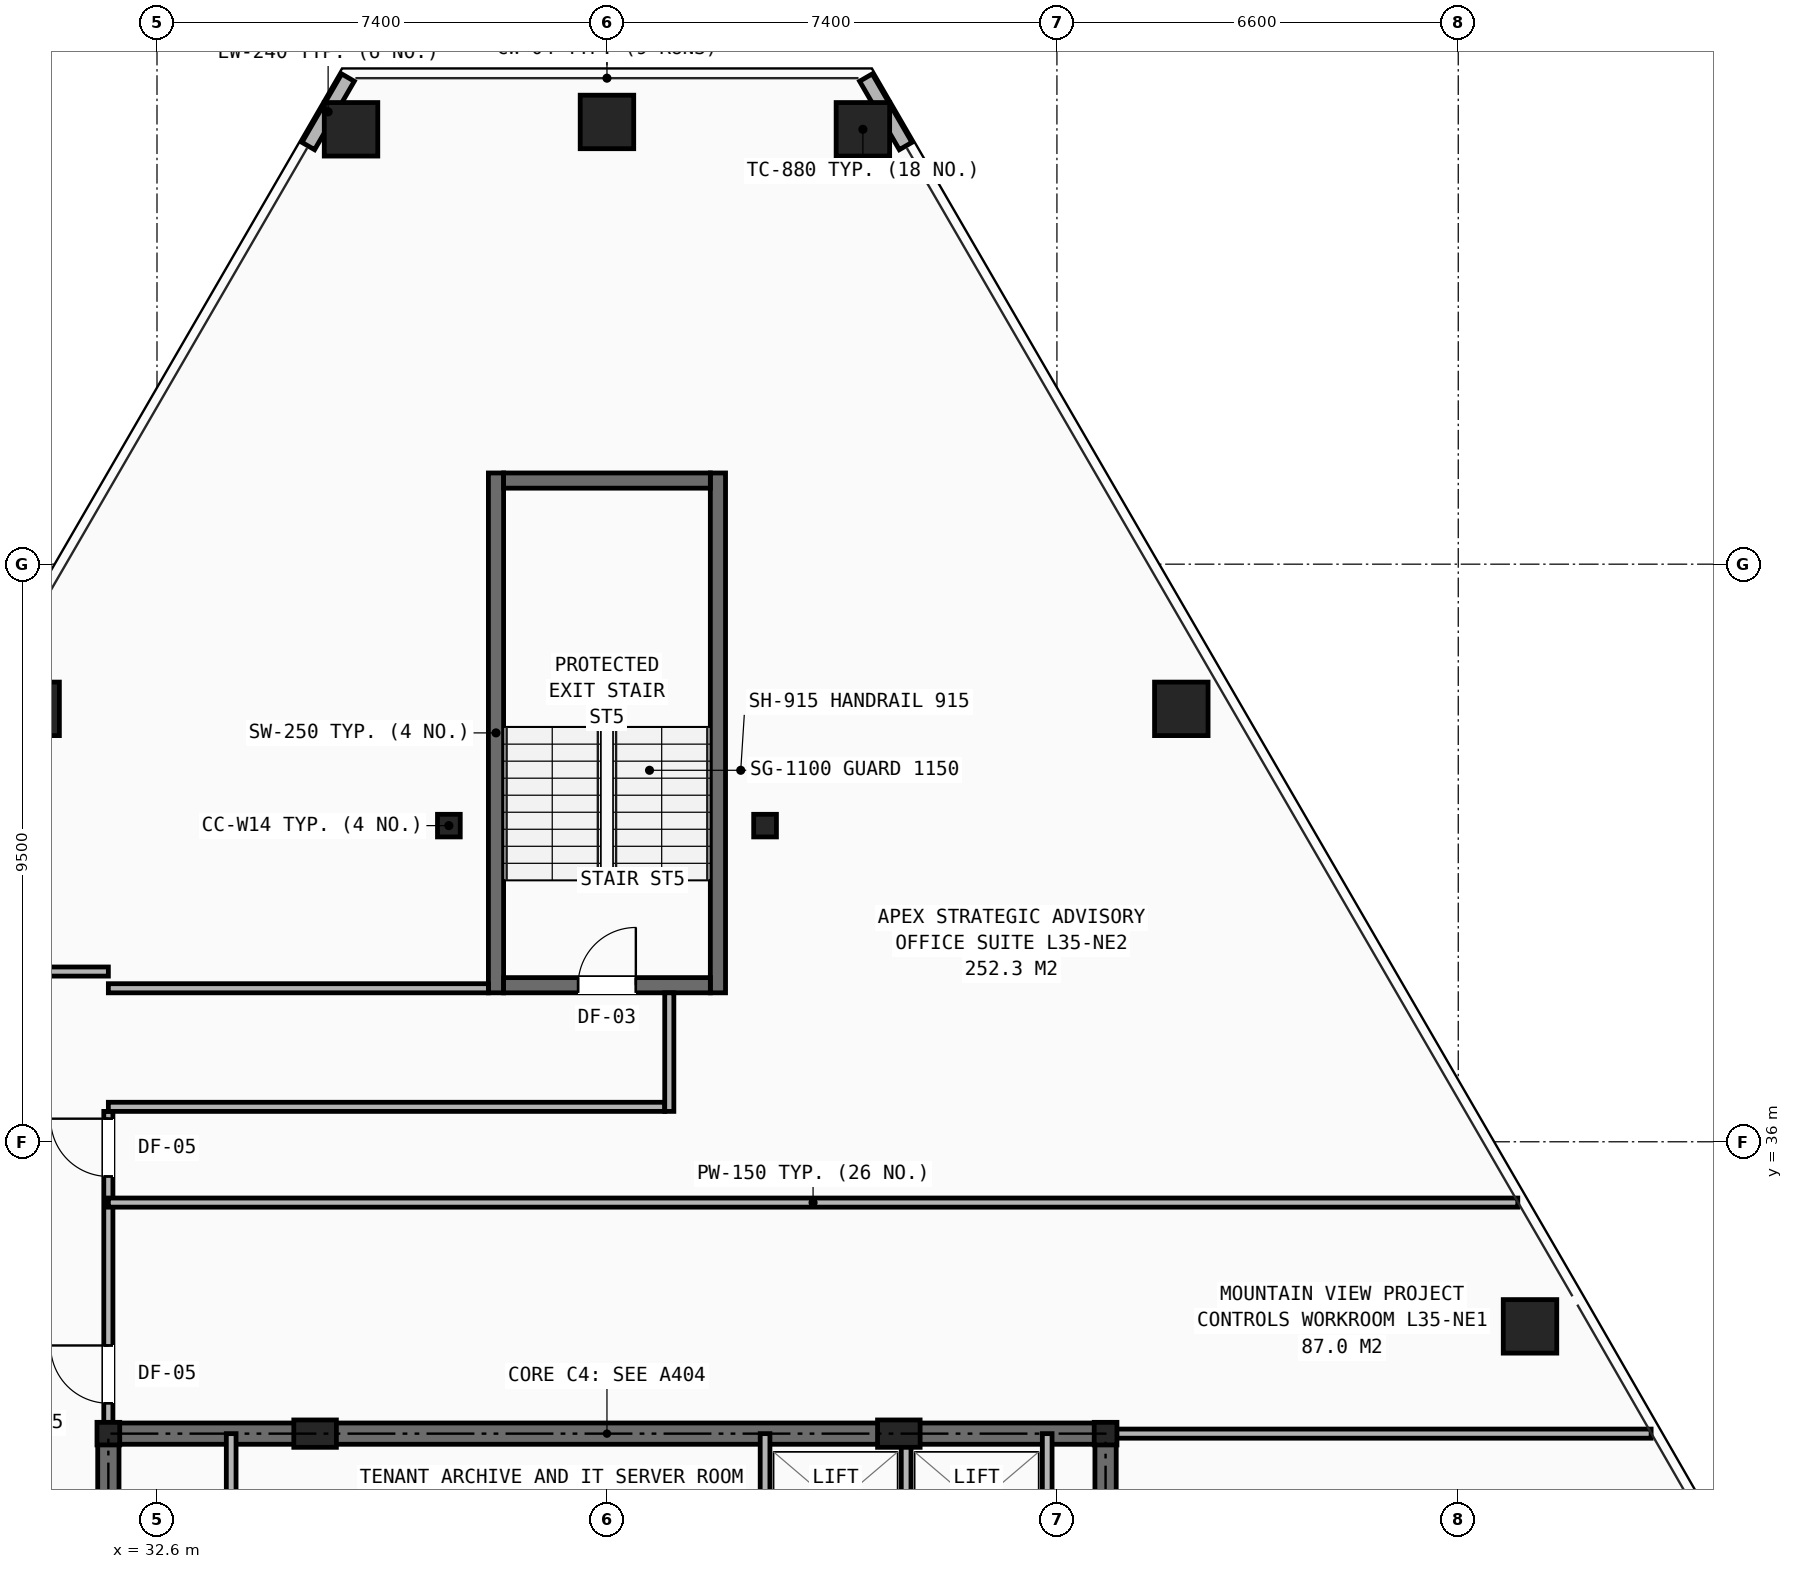
"""IFC4 building model, lengths in metres.
Left out: names, types, materials, properties, quantities, classifications, styles, units other than length and angle.
Written with IfcOpenShell. Run it as: python <this file> out.ifc"""

import sys

from ifc_helpers import new_model, si_unit, direction, frame, frame_2d, origin, origin_2d, place, context, subcontext, project, spatial, rectangle, hollow_rectangle, i_section, extrude, element, fill, save


model = new_model("IFC4")
c1 = context("Model", 3, precision=1e-05, world=origin(), true_north=direction((0.0, 1.0)))
c2 = subcontext(c1, "Body", "Model", "MODEL_VIEW")
j1 = project(units=[si_unit("LENGTHUNIT", "METRE"), si_unit("PLANEANGLEUNIT", "RADIAN")], contexts=[c1])
p1 = place(None, origin())
s1 = spatial("IfcSite", under=j1, at=p1, CompositionType="ELEMENT")
p2 = place(p1, origin())
s2 = spatial("IfcBuilding", under=s1, at=p2, CompositionType="ELEMENT")
p3 = place(p2, frame((0.0, 0.0, 122.9)))
s3 = spatial("IfcBuildingStorey", under=s2, at=p3, CompositionType="ELEMENT", Elevation=122.9)
for number, where, z_axis, x_axis in (
    (1, (31.8, 31.2, 0.0), (0.0, 0.0, 1.0), (1.0, 0.0, 0.0)),
    (2, (48.2, 31.2, 0.0), (0.0, 0.0, 1.0), (1.0, 0.0, 0.0)),
    (3, (37.4, 41.2, 0.0), (0.0, 0.0, 1.0), (1.0, 0.0, 0.0)),
    (4, (42.6, 41.2, 0.0), (0.0, 0.0, 1.0), (1.0, 0.0, 0.0)),
):
    element("IfcColumn", number, at=place(p3, frame(where, z_axis=z_axis, x_axis=x_axis)), inside=s3, PredefinedType="COLUMN", context=c2, shape_type="SweptSolid", body=[
        extrude(i_section(OverallWidth=0.374, OverallDepth=0.372, WebThickness=0.016, FlangeThickness=0.026, at=origin_2d()), origin(), (0.0, 0.0, 1.0), 3.45),
    ])
for number, where, z_axis, x_axis in (
    (5, (35.2, 31.2, 0.0), (0.0, 0.0, 1.0), (1.0, 0.0, 0.0)),
    (6, (44.8, 31.2, 0.0), (0.0, 0.0, 1.0), (1.0, 0.0, 0.0)),
):
    element("IfcColumn", number, at=place(p3, frame(where, z_axis=z_axis, x_axis=x_axis)), inside=s3, PredefinedType="PILASTER", context=c2, shape_type="SweptSolid", body=[
        extrude(rectangle(XDim=0.7, YDim=0.45, at=origin_2d()), origin(), (0.0, 0.0, 1.0), 3.45),
    ])
for number, where, z_axis, x_axis in (
    (7, (44.209, 52.652, 0.0), (0.0, 0.0, 1.0), (1.0, 0.0, 0.0)),
    (8, (40.0, 52.773, 0.0), (0.0, 0.0, 1.0), (1.0, 0.0, 0.0)),
    (9, (35.791, 52.652, 0.0), (0.0, 0.0, 1.0), (1.0, 0.0, 0.0)),
    (10, (30.554, 43.12, 0.0), (0.0, 0.0, 1.0), (1.0, 0.0, 0.0)),
    (11, (55.18, 32.964, 0.0), (0.0, 0.0, 1.0), (1.0, 0.0, 0.0)),
    (12, (49.446, 43.12, 0.0), (0.0, 0.0, 1.0), (1.0, 0.0, 0.0)),
):
    element("IfcColumn", number, at=place(p3, frame(where, z_axis=z_axis, x_axis=x_axis)), inside=s3, PredefinedType="COLUMN", context=c2, shape_type="SweptSolid", body=[
        extrude(hollow_rectangle(XDim=0.88, YDim=0.88, WallThickness=0.06, at=origin_2d()), origin(), (0.0, 0.0, 1.0), 3.45),
    ])
for number, where, z_axis, x_axis in (
    (13, (35.741, 53.503, 0.0), (0.0, 0.0, 1.0), (-0.502, -0.865, 0.0)),
    (14, (44.912, 52.377, 0.0), (0.0, 0.0, 1.0), (-0.502, 0.865, 0.0)),
):
    element("IfcWall", number, at=place(p3, frame(where, z_axis=z_axis, x_axis=x_axis)), inside=s3, PredefinedType="SHEAR", context=c2, shape_type="SweptSolid", body=[
        extrude(rectangle(XDim=1.302, YDim=0.24, at=frame_2d((0.651, 0.0))), origin(), (0.0, 0.0, 1.0), 2.583),
    ])
p4 = place(p3, frame((31.8, 31.2, 0.0), z_axis=(0.0, 0.0, 1.0), x_axis=(1.0, 0.0, 0.0)))
e15 = element("IfcWall", 15, at=p4, inside=s3, PredefinedType="SHEAR", context=c2, shape_type="SweptSolid", body=[
    extrude(rectangle(XDim=16.4, YDim=0.35, at=frame_2d((8.2, 0.0))), origin(), (0.0, 0.0, 1.0), 3.21),
])
p5 = place(p3, frame((31.8, 16.4, 0.0), z_axis=(0.0, 0.0, 1.0), x_axis=(0.0, 1.0, 0.0)))
e16 = element("IfcWall", 16, at=p5, inside=s3, PredefinedType="SHEAR", context=c2, shape_type="SweptSolid", body=[
    extrude(rectangle(XDim=14.8, YDim=0.35, at=frame_2d((7.4, 0.0))), origin(), (0.0, 0.0, 1.0), 3.21),
])
p6 = place(p5, frame((11.0, 0.0, 0.0)))
e17 = element("IfcOpeningElement", 17, at=p6, cuts=e16, PredefinedType="OPENING", context=c2, shape_type="SweptSolid", body=[
    extrude(rectangle(XDim=1.1, YDim=2.15, at=frame_2d((0.55, 1.075))), frame((0.0, 0.185, 0.0), z_axis=(0.0, -1.0, 0.0), x_axis=(1.0, 0.0, 0.0)), (0.0, 0.0, 1.0), 0.37),
])
p7 = place(p3, frame((48.2, 16.4, 0.0), z_axis=(0.0, 0.0, 1.0), x_axis=(0.0, 1.0, 0.0)))
e18 = element("IfcWall", 18, at=p7, inside=s3, PredefinedType="SHEAR", context=c2, shape_type="SweptSolid", body=[
    extrude(rectangle(XDim=14.8, YDim=0.35, at=frame_2d((7.4, 0.0))), origin(), (0.0, 0.0, 1.0), 3.21),
])
p8 = place(p7, frame((11.0, 0.0, 0.0)))
e19 = element("IfcOpeningElement", 19, at=p8, cuts=e18, PredefinedType="OPENING", context=c2, shape_type="SweptSolid", body=[
    extrude(rectangle(XDim=1.1, YDim=2.15, at=frame_2d((0.55, 1.075))), frame((0.0, 0.185, 0.0), z_axis=(0.0, -1.0, 0.0), x_axis=(1.0, 0.0, 0.0)), (0.0, 0.0, 1.0), 0.37),
])
for number, where, z_axis, x_axis in (
    (20, (33.82, 29.02, 0.0), (0.0, 0.0, 1.0), (0.0, 1.0, 0.0)),
    (21, (42.6, 29.02, 0.0), (0.0, 0.0, 1.0), (0.0, 1.0, 0.0)),
    (22, (44.92, 29.02, 0.0), (0.0, 0.0, 1.0), (0.0, 1.0, 0.0)),
    (23, (47.24, 29.02, 0.0), (0.0, 0.0, 1.0), (0.0, 1.0, 0.0)),
):
    element("IfcWall", number, at=place(p3, frame(where, z_axis=z_axis, x_axis=x_axis)), inside=s3, PredefinedType="SOLIDWALL", context=c2, shape_type="SweptSolid", body=[
        extrude(rectangle(XDim=2.18, YDim=0.16, at=frame_2d((1.09, 0.0))), origin(), (0.0, 0.0, 1.0), 2.938),
    ])
p9 = place(p3, frame((31.8, 31.2, 0.0), z_axis=(0.0, 0.0, 1.0), x_axis=(0.0, 1.0, 0.0)))
e24 = element("IfcWall", 24, at=p9, inside=s3, PredefinedType="PARTITIONING", context=c2, shape_type="SweptSolid", body=[
    extrude(rectangle(XDim=5.3, YDim=0.15, at=frame_2d((2.65, 0.0))), origin(), (0.0, 0.0, 1.0), 2.252),
])
p10 = place(p9, frame((0.5, 0.0, 0.0)))
e25 = element("IfcOpeningElement", 25, at=p10, cuts=e24, PredefinedType="OPENING", context=c2, shape_type="SweptSolid", body=[
    extrude(rectangle(XDim=0.95, YDim=2.1, at=frame_2d((0.475, 1.05))), frame((0.0, 0.085, 0.0), z_axis=(0.0, -1.0, 0.0), x_axis=(1.0, 0.0, 0.0)), (0.0, 0.0, 1.0), 0.17),
])
p11 = place(p9, frame((4.23, 0.0, 0.0)))
e26 = element("IfcOpeningElement", 26, at=p11, cuts=e24, PredefinedType="OPENING", context=c2, shape_type="SweptSolid", body=[
    extrude(rectangle(XDim=0.95, YDim=2.1, at=frame_2d((0.475, 1.05))), frame((0.0, 0.085, 0.0), z_axis=(0.0, -1.0, 0.0), x_axis=(1.0, 0.0, 0.0)), (0.0, 0.0, 1.0), 0.17),
])
p12 = place(p3, frame((29.6, 38.8, 0.0), z_axis=(0.0, 0.0, 1.0), x_axis=(1.0, 0.0, 0.0)))
e27 = element("IfcWall", 27, at=p12, inside=s3, PredefinedType="PARTITIONING", context=c2, shape_type="SweptSolid", body=[
    extrude(rectangle(XDim=2.2, YDim=0.15, at=frame_2d((1.1, 0.0))), origin(), (0.0, 0.0, 1.0), 2.743),
])
p13 = place(p3, frame((48.2, 31.2, 0.0), z_axis=(0.0, 0.0, 1.0), x_axis=(1.0, 0.0, 0.0)))
e28 = element("IfcWall", 28, at=p13, inside=s3, PredefinedType="PARTITIONING", context=c2, shape_type="SweptSolid", body=[
    extrude(rectangle(XDim=8.972, YDim=0.15, at=frame_2d((4.486, 0.0))), origin(), (0.0, 0.0, 1.0), 2.252),
])
p14 = place(p3, frame((31.8, 35.0, 0.0), z_axis=(0.0, 0.0, 1.0), x_axis=(1.0, 0.0, 0.0)))
e29 = element("IfcWall", 29, at=p14, inside=s3, PredefinedType="PARTITIONING", context=c2, shape_type="SweptSolid", body=[
    extrude(rectangle(XDim=23.179, YDim=0.15, at=frame_2d((11.59, 0.0))), origin(), (0.0, 0.0, 1.0), 2.589),
])
for number, where, z_axis, x_axis in (
    (30, (38.175, 38.45, 0.0), (0.0, 0.0, 1.0), (0.0, 1.0, 0.0)),
    (31, (41.825, 38.45, 0.0), (0.0, 0.0, 1.0), (0.0, 1.0, 0.0)),
):
    element("IfcWall", number, at=place(p3, frame(where, z_axis=z_axis, x_axis=x_axis)), inside=s3, PredefinedType="SHEAR", context=c2, shape_type="SweptSolid", body=[
        extrude(rectangle(XDim=8.55, YDim=0.25, at=frame_2d((4.275, 0.0))), origin(), (0.0, 0.0, 1.0), 3.21),
    ])
p15 = place(p3, frame((38.3, 38.575, 0.0), z_axis=(0.0, 0.0, 1.0), x_axis=(1.0, 0.0, 0.0)))
e32 = element("IfcWall", 32, at=p15, inside=s3, PredefinedType="SHEAR", context=c2, shape_type="SweptSolid", body=[
    extrude(rectangle(XDim=3.4, YDim=0.25, at=frame_2d((1.7, 0.0))), origin(), (0.0, 0.0, 1.0), 3.21),
])
p16 = place(p15, frame((1.225, 0.0, 0.0)))
e33 = element("IfcOpeningElement", 33, at=p16, cuts=e32, PredefinedType="OPENING", context=c2, shape_type="SweptSolid", body=[
    extrude(rectangle(XDim=0.95, YDim=2.1, at=frame_2d((0.475, 1.05))), frame((0.0, 0.135, 0.0), z_axis=(0.0, -1.0, 0.0), x_axis=(1.0, 0.0, 0.0)), (0.0, 0.0, 1.0), 0.27),
])
p17 = place(p3, frame((38.3, 46.875, 0.0), z_axis=(0.0, 0.0, 1.0), x_axis=(1.0, 0.0, 0.0)))
e34 = element("IfcWall", 34, at=p17, inside=s3, PredefinedType="SHEAR", context=c2, shape_type="SweptSolid", body=[
    extrude(rectangle(XDim=3.4, YDim=0.25, at=frame_2d((1.7, 0.0))), origin(), (0.0, 0.0, 1.0), 3.21),
])
p18 = place(p3, frame((31.8, 36.575, 0.0), z_axis=(0.0, 0.0, 1.0), x_axis=(1.0, 0.0, 0.0)))
e35 = element("IfcWall", 35, at=p18, inside=s3, PredefinedType="PARTITIONING", context=c2, shape_type="SweptSolid", body=[
    extrude(rectangle(XDim=9.15, YDim=0.15, at=frame_2d((4.575, 0.0))), origin(), (0.0, 0.0, 1.0), 3.21),
])
p19 = place(p3, frame((31.8, 38.525, 0.0), z_axis=(0.0, 0.0, 1.0), x_axis=(1.0, 0.0, 0.0)))
e36 = element("IfcWall", 36, at=p19, inside=s3, PredefinedType="PARTITIONING", context=c2, shape_type="SweptSolid", body=[
    extrude(rectangle(XDim=6.25, YDim=0.15, at=frame_2d((3.125, 0.0))), origin(), (0.0, 0.0, 1.0), 2.743),
])
p20 = place(p3, frame((41.025, 36.5, 0.0), z_axis=(0.0, 0.0, 1.0), x_axis=(0.0, 1.0, 0.0)))
e37 = element("IfcWall", 37, at=p20, inside=s3, PredefinedType="PARTITIONING", context=c2, shape_type="SweptSolid", body=[
    extrude(rectangle(XDim=1.95, YDim=0.15, at=frame_2d((0.975, 0.0))), origin(), (0.0, 0.0, 1.0), 3.21),
])
p21 = place(p10, origin())
e38 = element("IfcDoor", 38, at=p21, inside=s3, OperationType="SINGLE_SWING_RIGHT", PredefinedType="DOOR", context=c2, shape_type="SweptSolid", body=[
    extrude(rectangle(XDim=0.95, YDim=2.1, at=frame_2d((0.475, 1.05))), frame((0.0, 0.025, 0.0), z_axis=(0.0, -1.0, 0.0), x_axis=(1.0, 0.0, 0.0)), (0.0, 0.0, 1.0), 0.05),
])
fill(e25, e38)
p22 = place(p11, origin())
e39 = element("IfcDoor", 39, at=p22, inside=s3, OperationType="SINGLE_SWING_RIGHT", PredefinedType="DOOR", context=c2, shape_type="SweptSolid", body=[
    extrude(rectangle(XDim=0.95, YDim=2.1, at=frame_2d((0.475, 1.05))), frame((0.0, 0.025, 0.0), z_axis=(0.0, -1.0, 0.0), x_axis=(1.0, 0.0, 0.0)), (0.0, 0.0, 1.0), 0.05),
])
fill(e26, e39)
p23 = place(p16, origin())
e40 = element("IfcDoor", 40, at=p23, inside=s3, OperationType="SINGLE_SWING_RIGHT", PredefinedType="DOOR", context=c2, shape_type="SweptSolid", body=[
    extrude(rectangle(XDim=0.95, YDim=2.1, at=frame_2d((0.475, 1.05))), frame((0.0, 0.025, 0.0), z_axis=(0.0, -1.0, 0.0), x_axis=(1.0, 0.0, 0.0)), (0.0, 0.0, 1.0), 0.05),
])
fill(e33, e40)
save(model, sys.argv[1])
